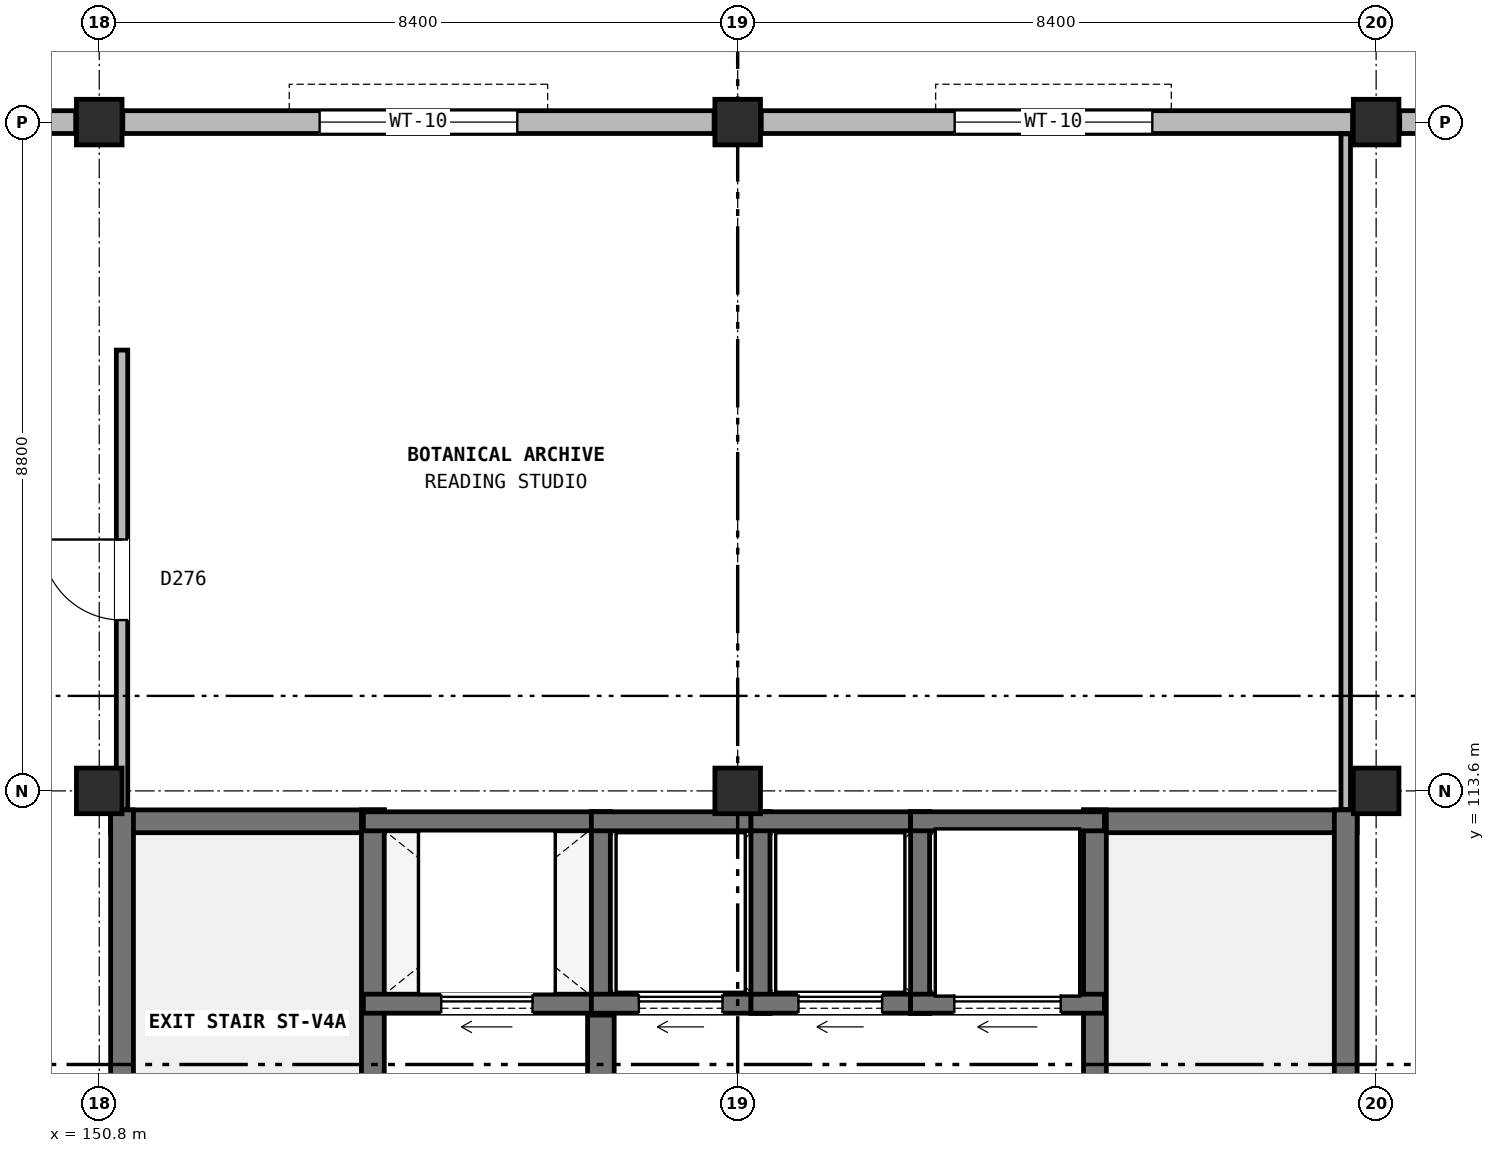
"""IFC4 building model, lengths in metres.
Left out: names, types, materials, properties, quantities, classifications, styles, units other than length and angle.
Written with IfcOpenShell. Run it as: python <this file> out.ifc"""

import sys

from ifc_helpers import new_model, si_unit, direction, frame, frame_2d, origin, origin_2d, place, context, subcontext, project, spatial, rectangle, extrude, element, fill, save


model = new_model("IFC4")
c1 = context("Model", 3, precision=1e-05, world=origin(), true_north=direction((0.0, 1.0)))
c2 = subcontext(c1, "Body", "Model", "MODEL_VIEW")
j1 = project(units=[si_unit("LENGTHUNIT", "METRE"), si_unit("PLANEANGLEUNIT", "RADIAN")], contexts=[c1])
p1 = place(None, origin())
s1 = spatial("IfcSite", under=j1, at=p1, CompositionType="ELEMENT")
p2 = place(p1, origin())
s2 = spatial("IfcBuilding", under=s1, at=p2, CompositionType="ELEMENT")
p3 = place(p2, frame((0.0, 0.0, 56.0)))
s3 = spatial("IfcBuildingStorey", under=s2, at=p3, CompositionType="ELEMENT", Elevation=56.0)
for number, where, z_axis, x_axis in (
    (1, (150.8, 113.6, 0.0), (0.0, 0.0, 1.0), (1.0, 0.0, 0.0)),
    (2, (150.8, 122.4, 0.0), (0.0, 0.0, 1.0), (1.0, 0.0, 0.0)),
    (3, (159.2, 113.6, 0.0), (0.0, 0.0, 1.0), (1.0, 0.0, 0.0)),
    (4, (159.2, 122.4, 0.0), (0.0, 0.0, 1.0), (1.0, 0.0, 0.0)),
    (5, (167.6, 113.6, 0.0), (0.0, 0.0, 1.0), (1.0, 0.0, 0.0)),
    (6, (167.6, 122.4, 0.0), (0.0, 0.0, 1.0), (1.0, 0.0, 0.0)),
):
    element("IfcColumn", number, at=place(p3, frame(where, z_axis=z_axis, x_axis=x_axis)), inside=s3, PredefinedType="COLUMN", context=c2, shape_type="SweptSolid", body=[
        extrude(rectangle(XDim=0.6, YDim=0.6, at=origin_2d()), origin(), (0.0, 0.0, 1.0), 3.8),
    ])
p4 = place(p3, frame((175.69, 122.4, 0.0), z_axis=(0.0, 0.0, 1.0), x_axis=(-1.0, 0.0, 0.0)))
e7 = element("IfcWall", 7, at=p4, inside=s3, PredefinedType="SOLIDWALL", context=c2, shape_type="SweptSolid", body=[
    extrude(rectangle(XDim=7.78, YDim=0.3, at=frame_2d((3.89, 0.0))), origin(), (0.0, 0.0, 1.0), 3.05),
])
p5 = place(p4, frame((0.745, 0.0, 0.9)))
e8 = element("IfcOpeningElement", 8, at=p5, cuts=e7, PredefinedType="OPENING", context=c2, shape_type="SweptSolid", body=[
    extrude(rectangle(XDim=2.6, YDim=2.0, at=frame_2d((1.3, 1.0))), frame((0.0, 0.16, 0.0), z_axis=(0.0, -1.0, 0.0), x_axis=(1.0, 0.0, 0.0)), (0.0, 0.0, 1.0), 0.32),
])
p6 = place(p3, frame((167.29, 122.4, 0.0), z_axis=(0.0, 0.0, 1.0), x_axis=(-1.0, 0.0, 0.0)))
e9 = element("IfcWall", 9, at=p6, inside=s3, PredefinedType="SOLIDWALL", context=c2, shape_type="SweptSolid", body=[
    extrude(rectangle(XDim=7.78, YDim=0.3, at=frame_2d((3.89, 0.0))), origin(), (0.0, 0.0, 1.0), 3.05),
])
p7 = place(p6, frame((2.635, 0.0, 0.9)))
e10 = element("IfcOpeningElement", 10, at=p7, cuts=e9, PredefinedType="OPENING", context=c2, shape_type="SweptSolid", body=[
    extrude(rectangle(XDim=2.6, YDim=2.0, at=frame_2d((1.3, 1.0))), frame((0.0, 0.16, 0.0), z_axis=(0.0, -1.0, 0.0), x_axis=(1.0, 0.0, 0.0)), (0.0, 0.0, 1.0), 0.32),
])
p8 = place(p3, frame((158.89, 122.4, 0.0), z_axis=(0.0, 0.0, 1.0), x_axis=(-1.0, 0.0, 0.0)))
e11 = element("IfcWall", 11, at=p8, inside=s3, PredefinedType="SOLIDWALL", context=c2, shape_type="SweptSolid", body=[
    extrude(rectangle(XDim=7.78, YDim=0.3, at=frame_2d((3.89, 0.0))), origin(), (0.0, 0.0, 1.0), 3.05),
])
p9 = place(p8, frame((2.59, 0.0, 0.9)))
e12 = element("IfcOpeningElement", 12, at=p9, cuts=e11, PredefinedType="OPENING", context=c2, shape_type="SweptSolid", body=[
    extrude(rectangle(XDim=2.6, YDim=2.0, at=frame_2d((1.3, 1.0))), frame((0.0, 0.16, 0.0), z_axis=(0.0, -1.0, 0.0), x_axis=(1.0, 0.0, 0.0)), (0.0, 0.0, 1.0), 0.32),
])
p10 = place(p3, frame((150.49, 122.4, 0.0), z_axis=(0.0, 0.0, 1.0), x_axis=(-1.0, 0.0, 0.0)))
e13 = element("IfcWall", 13, at=p10, inside=s3, PredefinedType="SOLIDWALL", context=c2, shape_type="SweptSolid", body=[
    extrude(rectangle(XDim=7.78, YDim=0.3, at=frame_2d((3.89, 0.0))), origin(), (0.0, 0.0, 1.0), 3.05),
])
p11 = place(p10, frame((2.59, 0.0, 0.9)))
e14 = element("IfcOpeningElement", 14, at=p11, cuts=e13, PredefinedType="OPENING", context=c2, shape_type="SweptSolid", body=[
    extrude(rectangle(XDim=2.6, YDim=2.0, at=frame_2d((1.3, 1.0))), frame((0.0, 0.16, 0.0), z_axis=(0.0, -1.0, 0.0), x_axis=(1.0, 0.0, 0.0)), (0.0, 0.0, 1.0), 0.32),
])
p12 = place(p3, frame((150.95, 113.2, 0.0), z_axis=(0.0, 0.0, 1.0), x_axis=(1.0, 0.0, 0.0)))
e15 = element("IfcWall", 15, at=p12, inside=s3, PredefinedType="SHEAR", context=c2, shape_type="SweptSolid", body=[
    extrude(rectangle(XDim=3.6, YDim=0.3, at=frame_2d((1.8, 0.0))), origin(), (0.0, 0.0, 1.0), 3.8),
])
p13 = place(p3, frame((151.1, 105.05, 0.0), z_axis=(0.0, 0.0, 1.0), x_axis=(0.0, 1.0, 0.0)))
e16 = element("IfcWall", 16, at=p13, inside=s3, PredefinedType="SHEAR", context=c2, shape_type="SweptSolid", body=[
    extrude(rectangle(XDim=8.3, YDim=0.3, at=frame_2d((4.15, 0.0))), origin(), (0.0, 0.0, 1.0), 3.8),
])
p14 = place(p3, frame((154.4, 105.05, 0.0), z_axis=(0.0, 0.0, 1.0), x_axis=(0.0, 1.0, 0.0)))
e17 = element("IfcWall", 17, at=p14, inside=s3, PredefinedType="SHEAR", context=c2, shape_type="SweptSolid", body=[
    extrude(rectangle(XDim=8.3, YDim=0.3, at=frame_2d((4.15, 0.0))), origin(), (0.0, 0.0, 1.0), 3.8),
])
p15 = place(p14, frame((0.45, 0.0, 0.0)))
e18 = element("IfcOpeningElement", 18, at=p15, cuts=e17, PredefinedType="OPENING", context=c2, shape_type="SweptSolid", body=[
    extrude(rectangle(XDim=1.1, YDim=2.2, at=frame_2d((0.55, 1.1))), frame((0.0, 0.16, 0.0), z_axis=(0.0, -1.0, 0.0), x_axis=(1.0, 0.0, 0.0)), (0.0, 0.0, 1.0), 0.32),
])
p16 = place(p3, frame((163.75, 113.2, 0.0), z_axis=(0.0, 0.0, 1.0), x_axis=(1.0, 0.0, 0.0)))
e19 = element("IfcWall", 19, at=p16, inside=s3, PredefinedType="SHEAR", context=c2, shape_type="SweptSolid", body=[
    extrude(rectangle(XDim=3.6, YDim=0.3, at=frame_2d((1.8, 0.0))), origin(), (0.0, 0.0, 1.0), 3.8),
])
for number, where, z_axis, x_axis in (
    (20, (163.9, 105.05, 0.0), (0.0, 0.0, 1.0), (0.0, 1.0, 0.0)),
    (21, (167.2, 105.05, 0.0), (0.0, 0.0, 1.0), (0.0, 1.0, 0.0)),
):
    element("IfcWall", number, at=place(p3, frame(where, z_axis=z_axis, x_axis=x_axis)), inside=s3, PredefinedType="SHEAR", context=c2, shape_type="SweptSolid", body=[
        extrude(rectangle(XDim=8.3, YDim=0.3, at=frame_2d((4.15, 0.0))), origin(), (0.0, 0.0, 1.0), 3.8),
    ])
p17 = place(p3, frame((154.275, 110.8, 0.0), z_axis=(0.0, 0.0, 1.0), x_axis=(1.0, 0.0, 0.0)))
e22 = element("IfcWall", 22, at=p17, inside=s3, PredefinedType="SOLIDWALL", context=c2, shape_type="SweptSolid", body=[
    extrude(rectangle(XDim=3.25, YDim=0.25, at=frame_2d((1.625, 0.0))), origin(), (0.0, 0.0, 1.0), 3.48),
])
p18 = place(p17, frame((1.025, 0.0, 0.0)))
e23 = element("IfcOpeningElement", 23, at=p18, cuts=e22, PredefinedType="OPENING", context=c2, shape_type="SweptSolid", body=[
    extrude(rectangle(XDim=1.2, YDim=2.2, at=frame_2d((0.6, 1.1))), frame((0.0, 0.135, 0.0), z_axis=(0.0, -1.0, 0.0), x_axis=(1.0, 0.0, 0.0)), (0.0, 0.0, 1.0), 0.27),
])
p19 = place(p3, frame((154.275, 113.2, 0.0), z_axis=(0.0, 0.0, 1.0), x_axis=(1.0, 0.0, 0.0)))
e24 = element("IfcWall", 24, at=p19, inside=s3, PredefinedType="SOLIDWALL", context=c2, shape_type="SweptSolid", body=[
    extrude(rectangle(XDim=3.25, YDim=0.25, at=frame_2d((1.625, 0.0))), origin(), (0.0, 0.0, 1.0), 3.48),
])
p20 = place(p3, frame((157.4, 110.675, 0.0), z_axis=(0.0, 0.0, 1.0), x_axis=(0.0, 1.0, 0.0)))
e25 = element("IfcWall", 25, at=p20, inside=s3, PredefinedType="SOLIDWALL", context=c2, shape_type="SweptSolid", body=[
    extrude(rectangle(XDim=2.65, YDim=0.25, at=frame_2d((1.325, 0.0))), origin(), (0.0, 0.0, 1.0), 3.48),
])
p21 = place(p3, frame((157.275, 110.8, 0.0), z_axis=(0.0, 0.0, 1.0), x_axis=(1.0, 0.0, 0.0)))
e26 = element("IfcWall", 26, at=p21, inside=s3, PredefinedType="SOLIDWALL", context=c2, shape_type="SweptSolid", body=[
    extrude(rectangle(XDim=2.35, YDim=0.25, at=frame_2d((1.175, 0.0))), origin(), (0.0, 0.0, 1.0), 3.48),
])
p22 = place(p21, frame((0.625, 0.0, 0.0)))
e27 = element("IfcOpeningElement", 27, at=p22, cuts=e26, PredefinedType="OPENING", context=c2, shape_type="SweptSolid", body=[
    extrude(rectangle(XDim=1.1, YDim=2.2, at=frame_2d((0.55, 1.1))), frame((0.0, 0.135, 0.0), z_axis=(0.0, -1.0, 0.0), x_axis=(1.0, 0.0, 0.0)), (0.0, 0.0, 1.0), 0.27),
])
p23 = place(p3, frame((157.275, 113.2, 0.0), z_axis=(0.0, 0.0, 1.0), x_axis=(1.0, 0.0, 0.0)))
e28 = element("IfcWall", 28, at=p23, inside=s3, PredefinedType="SOLIDWALL", context=c2, shape_type="SweptSolid", body=[
    extrude(rectangle(XDim=2.35, YDim=0.25, at=frame_2d((1.175, 0.0))), origin(), (0.0, 0.0, 1.0), 3.48),
])
p24 = place(p3, frame((159.5, 110.675, 0.0), z_axis=(0.0, 0.0, 1.0), x_axis=(0.0, 1.0, 0.0)))
e29 = element("IfcWall", 29, at=p24, inside=s3, PredefinedType="SOLIDWALL", context=c2, shape_type="SweptSolid", body=[
    extrude(rectangle(XDim=2.65, YDim=0.25, at=frame_2d((1.325, 0.0))), origin(), (0.0, 0.0, 1.0), 3.48),
])
p25 = place(p3, frame((159.375, 110.8, 0.0), z_axis=(0.0, 0.0, 1.0), x_axis=(1.0, 0.0, 0.0)))
e30 = element("IfcWall", 30, at=p25, inside=s3, PredefinedType="SOLIDWALL", context=c2, shape_type="SweptSolid", body=[
    extrude(rectangle(XDim=2.35, YDim=0.25, at=frame_2d((1.175, 0.0))), origin(), (0.0, 0.0, 1.0), 3.48),
])
p26 = place(p25, frame((0.625, 0.0, 0.0)))
e31 = element("IfcOpeningElement", 31, at=p26, cuts=e30, PredefinedType="OPENING", context=c2, shape_type="SweptSolid", body=[
    extrude(rectangle(XDim=1.1, YDim=2.2, at=frame_2d((0.55, 1.1))), frame((0.0, 0.135, 0.0), z_axis=(0.0, -1.0, 0.0), x_axis=(1.0, 0.0, 0.0)), (0.0, 0.0, 1.0), 0.27),
])
p27 = place(p3, frame((159.375, 113.2, 0.0), z_axis=(0.0, 0.0, 1.0), x_axis=(1.0, 0.0, 0.0)))
e32 = element("IfcWall", 32, at=p27, inside=s3, PredefinedType="SOLIDWALL", context=c2, shape_type="SweptSolid", body=[
    extrude(rectangle(XDim=2.35, YDim=0.25, at=frame_2d((1.175, 0.0))), origin(), (0.0, 0.0, 1.0), 3.48),
])
p28 = place(p3, frame((161.6, 110.675, 0.0), z_axis=(0.0, 0.0, 1.0), x_axis=(0.0, 1.0, 0.0)))
e33 = element("IfcWall", 33, at=p28, inside=s3, PredefinedType="SOLIDWALL", context=c2, shape_type="SweptSolid", body=[
    extrude(rectangle(XDim=2.65, YDim=0.25, at=frame_2d((1.325, 0.0))), origin(), (0.0, 0.0, 1.0), 3.48),
])
p29 = place(p3, frame((161.475, 110.8, 0.0), z_axis=(0.0, 0.0, 1.0), x_axis=(1.0, 0.0, 0.0)))
e34 = element("IfcWall", 34, at=p29, inside=s3, PredefinedType="SOLIDWALL", context=c2, shape_type="SweptSolid", body=[
    extrude(rectangle(XDim=2.55, YDim=0.25, at=frame_2d((1.275, 0.0))), origin(), (0.0, 0.0, 1.0), 3.48),
])
p30 = place(p29, frame((0.575, 0.0, 0.0)))
e35 = element("IfcOpeningElement", 35, at=p30, cuts=e34, PredefinedType="OPENING", context=c2, shape_type="SweptSolid", body=[
    extrude(rectangle(XDim=1.4, YDim=2.3, at=frame_2d((0.7, 1.15))), frame((0.0, 0.135, 0.0), z_axis=(0.0, -1.0, 0.0), x_axis=(1.0, 0.0, 0.0)), (0.0, 0.0, 1.0), 0.27),
])
p31 = place(p3, frame((161.475, 113.2, 0.0), z_axis=(0.0, 0.0, 1.0), x_axis=(1.0, 0.0, 0.0)))
e36 = element("IfcWall", 36, at=p31, inside=s3, PredefinedType="SOLIDWALL", context=c2, shape_type="SweptSolid", body=[
    extrude(rectangle(XDim=2.55, YDim=0.25, at=frame_2d((1.275, 0.0))), origin(), (0.0, 0.0, 1.0), 3.48),
])
p32 = place(p3, frame((157.4, 107.75, 0.0), z_axis=(0.0, 0.0, 1.0), x_axis=(0.0, 1.0, 0.0)))
e37 = element("IfcWall", 37, at=p32, inside=s3, PredefinedType="SHEAR", context=c2, shape_type="SweptSolid", body=[
    extrude(rectangle(XDim=2.9, YDim=0.35, at=frame_2d((1.45, 0.0))), origin(), (0.0, 0.0, 1.0), 3.48),
])
p33 = place(p3, frame((151.1, 113.355, 0.0), z_axis=(0.0, 0.0, 1.0), x_axis=(0.0, 1.0, 0.0)))
e38 = element("IfcWall", 38, at=p33, inside=s3, PredefinedType="PARTITIONING", context=c2, shape_type="SweptSolid", body=[
    extrude(rectangle(XDim=6.045, YDim=0.15, at=frame_2d((3.022, 0.0))), origin(), (0.0, 0.0, 1.0), 3.045),
])
p34 = place(p33, frame((2.492, 0.0, 0.0)))
e39 = element("IfcOpeningElement", 39, at=p34, cuts=e38, PredefinedType="OPENING", context=c2, shape_type="SweptSolid", body=[
    extrude(rectangle(XDim=1.06, YDim=2.18, at=frame_2d((0.53, 1.09))), frame((0.0, 0.085, 0.0), z_axis=(0.0, -1.0, 0.0), x_axis=(1.0, 0.0, 0.0)), (0.0, 0.0, 1.0), 0.17),
])
p35 = place(p3, frame((167.2, 113.355, 0.0), z_axis=(0.0, 0.0, 1.0), x_axis=(0.0, 1.0, 0.0)))
e40 = element("IfcWall", 40, at=p35, inside=s3, PredefinedType="PARTITIONING", context=c2, shape_type="SweptSolid", body=[
    extrude(rectangle(XDim=8.89, YDim=0.125, at=frame_2d((4.445, 0.0))), origin(), (0.0, 0.0, 1.0), 3.045),
])
p36 = place(p7, origin())
e41 = element("IfcWindow", 41, at=p36, inside=s3, PartitioningType="SINGLE_PANEL", PredefinedType="WINDOW", context=c2, shape_type="SweptSolid", body=[
    extrude(rectangle(XDim=2.6, YDim=2.0, at=frame_2d((1.3, 1.0))), frame((0.0, 0.03, 0.0), z_axis=(0.0, -1.0, 0.0), x_axis=(1.0, 0.0, 0.0)), (0.0, 0.0, 1.0), 0.06),
])
fill(e10, e41)
p37 = place(p9, origin())
e42 = element("IfcWindow", 42, at=p37, inside=s3, PartitioningType="SINGLE_PANEL", PredefinedType="WINDOW", context=c2, shape_type="SweptSolid", body=[
    extrude(rectangle(XDim=2.6, YDim=2.0, at=frame_2d((1.3, 1.0))), frame((0.0, 0.03, 0.0), z_axis=(0.0, -1.0, 0.0), x_axis=(1.0, 0.0, 0.0)), (0.0, 0.0, 1.0), 0.06),
])
fill(e12, e42)
p38 = place(p18, origin())
e43 = element("IfcDoor", 43, at=p38, inside=s3, OperationType="SLIDING_TO_LEFT", PredefinedType="DOOR", context=c2, shape_type="SweptSolid", body=[
    extrude(rectangle(XDim=1.2, YDim=2.2, at=frame_2d((0.6, 1.1))), frame((0.0, 0.025, 0.0), z_axis=(0.0, -1.0, 0.0), x_axis=(1.0, 0.0, 0.0)), (0.0, 0.0, 1.0), 0.05),
])
fill(e23, e43)
p39 = place(p22, origin())
e44 = element("IfcDoor", 44, at=p39, inside=s3, OperationType="SLIDING_TO_LEFT", PredefinedType="DOOR", context=c2, shape_type="SweptSolid", body=[
    extrude(rectangle(XDim=1.1, YDim=2.2, at=frame_2d((0.55, 1.1))), frame((0.0, 0.025, 0.0), z_axis=(0.0, -1.0, 0.0), x_axis=(1.0, 0.0, 0.0)), (0.0, 0.0, 1.0), 0.05),
])
fill(e27, e44)
p40 = place(p26, origin())
e45 = element("IfcDoor", 45, at=p40, inside=s3, OperationType="SLIDING_TO_LEFT", PredefinedType="DOOR", context=c2, shape_type="SweptSolid", body=[
    extrude(rectangle(XDim=1.1, YDim=2.2, at=frame_2d((0.55, 1.1))), frame((0.0, 0.025, 0.0), z_axis=(0.0, -1.0, 0.0), x_axis=(1.0, 0.0, 0.0)), (0.0, 0.0, 1.0), 0.05),
])
fill(e31, e45)
p41 = place(p30, origin())
e46 = element("IfcDoor", 46, at=p41, inside=s3, OperationType="SLIDING_TO_LEFT", PredefinedType="DOOR", context=c2, shape_type="SweptSolid", body=[
    extrude(rectangle(XDim=1.4, YDim=2.3, at=frame_2d((0.7, 1.15))), frame((0.0, 0.025, 0.0), z_axis=(0.0, -1.0, 0.0), x_axis=(1.0, 0.0, 0.0)), (0.0, 0.0, 1.0), 0.05),
])
fill(e35, e46)
p42 = place(p34, origin())
e47 = element("IfcDoor", 47, at=p42, inside=s3, OperationType="SINGLE_SWING_RIGHT", PredefinedType="DOOR", context=c2, shape_type="SweptSolid", body=[
    extrude(rectangle(XDim=1.06, YDim=2.18, at=frame_2d((0.53, 1.09))), frame((0.0, 0.025, 0.0), z_axis=(0.0, -1.0, 0.0), x_axis=(1.0, 0.0, 0.0)), (0.0, 0.0, 1.0), 0.05),
])
fill(e39, e47)
save(model, sys.argv[1])
